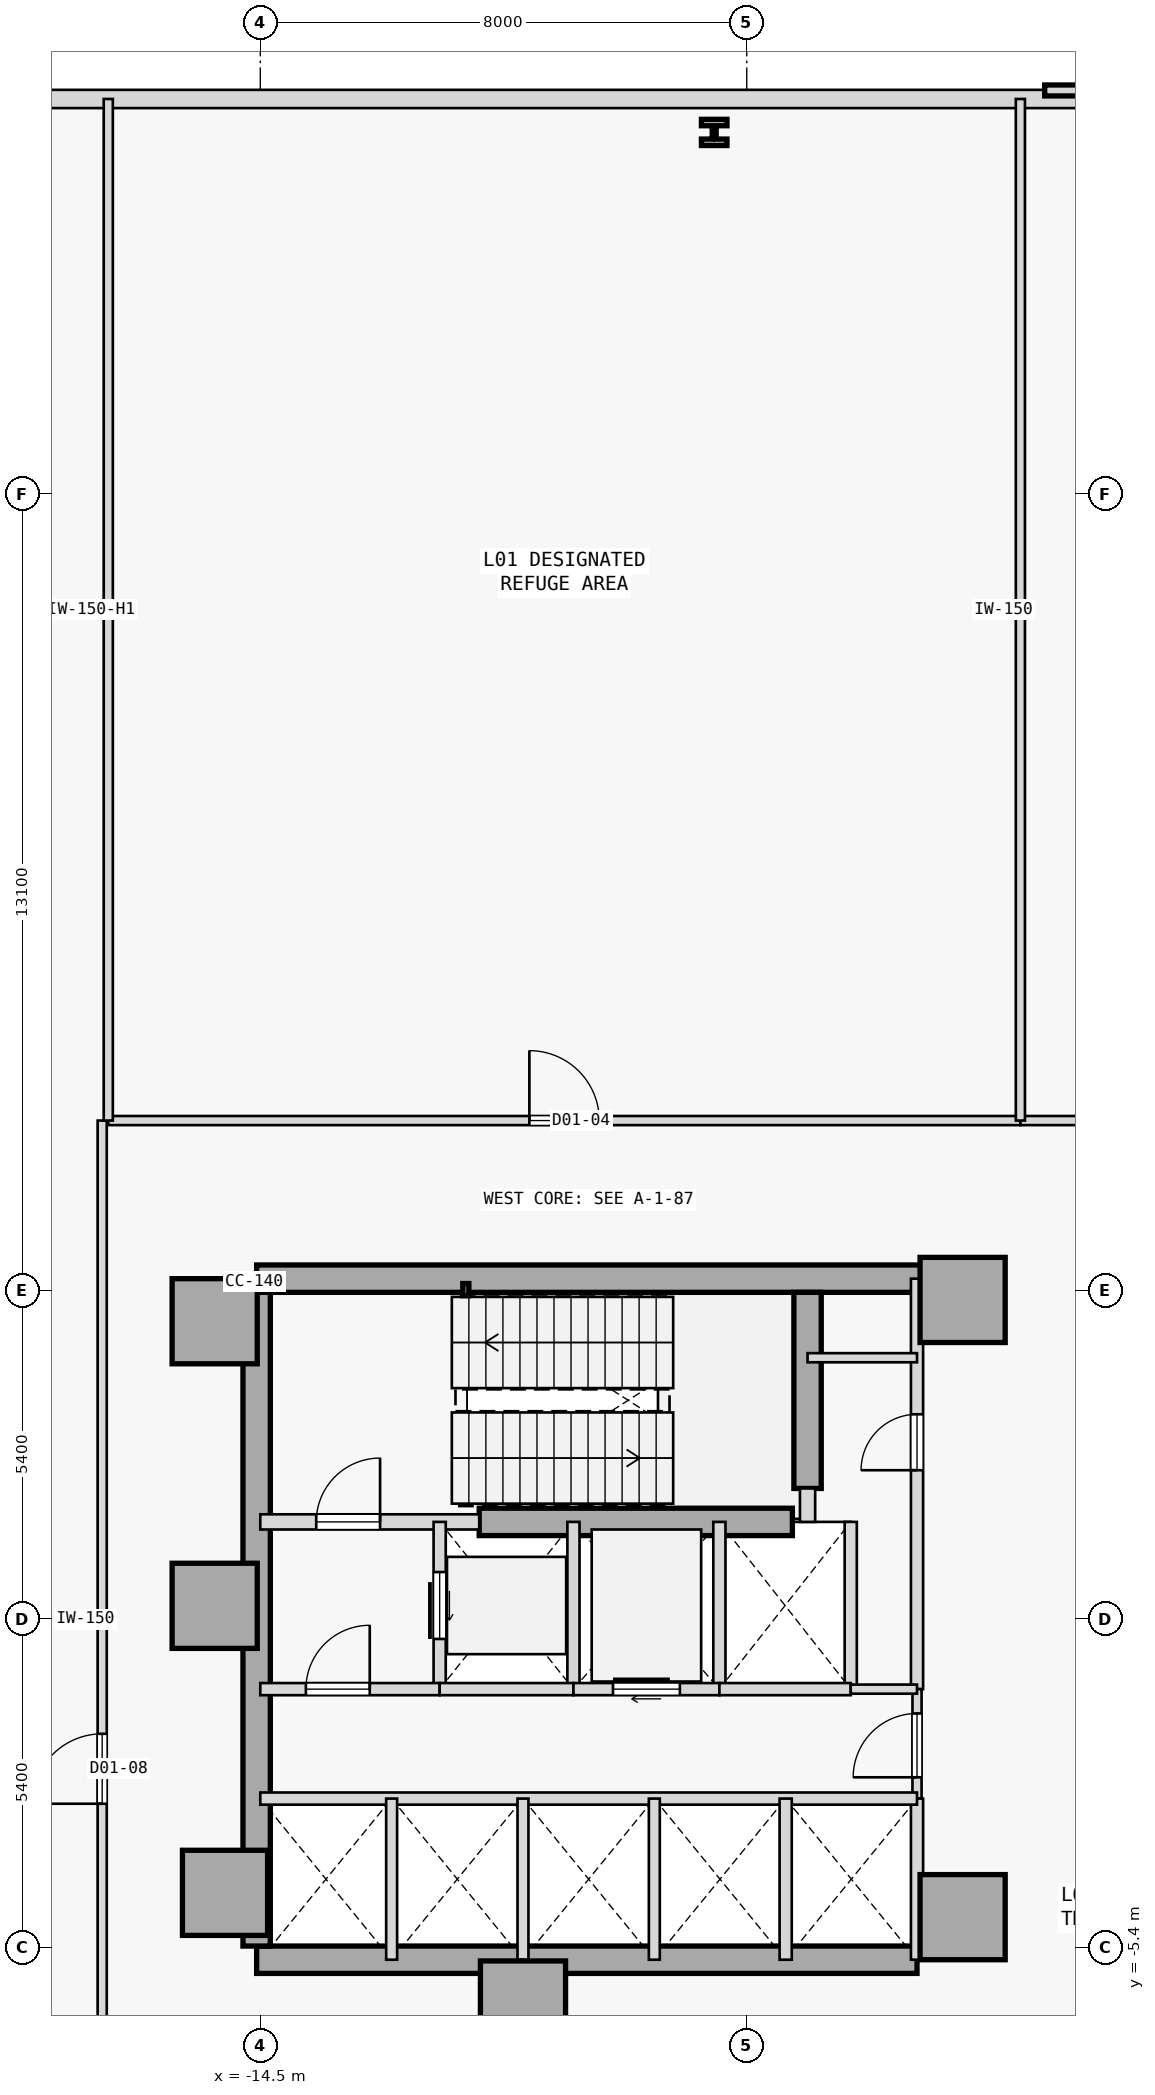
"""IFC4 building model, lengths in metres.
Left out: names, types, materials, properties, quantities, classifications, styles, units other than length and angle.
Written with IfcOpenShell. Run it as: python <this file> out.ifc"""

import sys

from ifc_helpers import new_model, si_unit, direction, frame, frame_2d, origin, origin_2d, place, context, subcontext, project, spatial, rectangle, hollow_rectangle, i_section, extrude, element, fill, save


model = new_model("IFC4")
c1 = context("Model", 3, precision=1e-05, world=origin(), true_north=direction((0.0, 1.0)))
c2 = subcontext(c1, "Body", "Model", "MODEL_VIEW")
j1 = project(units=[si_unit("LENGTHUNIT", "METRE"), si_unit("PLANEANGLEUNIT", "RADIAN")], contexts=[c1])
p1 = place(None, origin())
s1 = spatial("IfcSite", under=j1, at=p1, CompositionType="ELEMENT")
p2 = place(p1, origin())
s2 = spatial("IfcBuilding", under=s1, at=p2, CompositionType="ELEMENT")
p3 = place(p2, frame((0.0, 0.0, 9.6)))
s3 = spatial("IfcBuildingStorey", under=s2, at=p3, CompositionType="ELEMENT", Elevation=9.6)
for number, where, z_axis, x_axis in (
    (1, (-15.25, 4.9, 0.0), (0.0, 0.0, 1.0), (1.0, 0.0, 0.0)),
    (2, (-15.25, 0.22, 0.0), (0.0, 0.0, 1.0), (1.0, 0.0, 0.0)),
    (3, (-15.08, -4.5, 0.0), (0.0, 0.0, 1.0), (1.0, 0.0, 0.0)),
    (4, (-10.18, -6.32, 0.0), (0.0, 0.0, 1.0), (1.0, 0.0, 0.0)),
    (5, (-2.95, -4.9, 0.0), (0.0, 0.0, 1.0), (1.0, 0.0, 0.0)),
    (6, (-2.95, 5.25, 0.0), (0.0, 0.0, 1.0), (1.0, 0.0, 0.0)),
):
    element("IfcColumn", number, at=place(p3, frame(where, z_axis=z_axis, x_axis=x_axis)), inside=s3, PredefinedType="COLUMN", context=c2, shape_type="SweptSolid", body=[
        extrude(rectangle(XDim=1.4, YDim=1.4, at=origin_2d()), origin(), (0.0, 0.0, 1.0), 4.6),
    ])
p4 = place(p3, frame((-14.56, 5.6, 0.0), z_axis=(0.0, 0.0, 1.0), x_axis=(1.0, 0.0, 0.0)))
e7 = element("IfcWall", 7, at=p4, inside=s3, PredefinedType="SHEAR", context=c2, shape_type="SweptSolid", body=[
    extrude(rectangle(XDim=11.41, YDim=0.45, at=frame_2d((5.705, 0.0))), origin(), (0.0, 0.0, 1.0), 4.375),
])
p5 = place(p3, frame((-14.56, -5.6, 0.0), z_axis=(0.0, 0.0, 1.0), x_axis=(1.0, 0.0, 0.0)))
e8 = element("IfcWall", 8, at=p5, inside=s3, PredefinedType="SHEAR", context=c2, shape_type="SweptSolid", body=[
    extrude(rectangle(XDim=10.86, YDim=0.45, at=frame_2d((5.43, 0.0))), origin(), (0.0, 0.0, 1.0), 4.375),
])
p6 = place(p3, frame((-14.56, -5.375, 0.0), z_axis=(0.0, 0.0, 1.0), x_axis=(0.0, 1.0, 0.0)))
e9 = element("IfcWall", 9, at=p6, inside=s3, PredefinedType="SHEAR", context=c2, shape_type="SweptSolid", body=[
    extrude(rectangle(XDim=10.75, YDim=0.45, at=frame_2d((5.375, 0.0))), origin(), (0.0, 0.0, 1.0), 4.375),
])
p7 = place(p3, frame((-5.5, 2.15, 0.0), z_axis=(0.0, 0.0, 1.0), x_axis=(0.0, 1.0, 0.0)))
e10 = element("IfcWall", 10, at=p7, inside=s3, PredefinedType="SHEAR", context=c2, shape_type="SweptSolid", body=[
    extrude(rectangle(XDim=3.225, YDim=0.45, at=frame_2d((1.613, 0.0))), origin(), (0.0, 0.0, 1.0), 4.375),
])
p8 = place(p3, frame((-10.9, 1.6, 0.0), z_axis=(0.0, 0.0, 1.0), x_axis=(1.0, 0.0, 0.0)))
e11 = element("IfcWall", 11, at=p8, inside=s3, PredefinedType="SHEAR", context=c2, shape_type="SweptSolid", body=[
    extrude(rectangle(XDim=5.15, YDim=0.45, at=frame_2d((2.575, 0.0))), origin(), (0.0, 0.0, 1.0), 4.375),
])
p9 = place(p3, frame((-11.12, 5.42, 0.0), z_axis=(0.0, 0.0, 1.0), x_axis=(1.0, 0.0, 0.0)))
e12 = element("IfcColumn", 12, at=p9, inside=s3, PredefinedType="COLUMN", context=c2, shape_type="SweptSolid", body=[
    extrude(hollow_rectangle(XDim=0.1, YDim=0.2, WallThickness=0.008, at=origin_2d()), origin(), (0.0, 0.0, 1.0), 4.6),
])
p10 = place(p3, frame((-7.036, 24.45, 0.0), z_axis=(0.0, 0.0, 1.0), x_axis=(1.0, 0.0, 0.0)))
e13 = element("IfcColumn", 13, at=p10, inside=s3, PredefinedType="COLUMN", context=c2, shape_type="SweptSolid", body=[
    extrude(i_section(OverallWidth=0.42, OverallDepth=0.431, WebThickness=0.065, FlangeThickness=0.106, FilletRadius=0.015, at=origin_2d()), origin(), (0.0, 0.0, 1.0), 4.6),
])
p11 = place(p3, frame((35.455, 25.0, 0.0), z_axis=(0.0, 0.0, 1.0), x_axis=(-1.0, 0.0, 0.0)))
e14 = element("IfcWall", 14, at=p11, inside=s3, PredefinedType="STANDARD", context=c2, shape_type="SweptSolid", body=[
    extrude(rectangle(XDim=70.91, YDim=0.3, at=frame_2d((35.455, 0.0))), origin(), (0.0, 0.0, 1.0), 4.375),
])
p12 = place(p3, frame((-14.5, 1.6, 0.0), z_axis=(0.0, 0.0, 1.0), x_axis=(1.0, 0.0, 0.0)))
e15 = element("IfcWall", 15, at=p12, inside=s3, PredefinedType="STANDARD", context=c2, shape_type="SweptSolid", body=[
    extrude(rectangle(XDim=3.6, YDim=0.25, at=frame_2d((1.8, 0.0))), origin(), (0.0, 0.0, 1.0), 4.375),
])
p13 = place(p12, frame((0.92, 0.0, 0.0)))
e16 = element("IfcOpeningElement", 16, at=p13, cuts=e15, PredefinedType="OPENING", context=c2, shape_type="SweptSolid", body=[
    extrude(rectangle(XDim=1.05, YDim=2.15, at=frame_2d((0.525, 1.075))), frame((0.0, 0.135, 0.0), z_axis=(0.0, -1.0, 0.0), x_axis=(1.0, 0.0, 0.0)), (0.0, 0.0, 1.0), 0.27),
])
p14 = place(p3, frame((-5.5, 1.6, 0.0), z_axis=(0.0, 0.0, 1.0), x_axis=(0.0, 1.0, 0.0)))
e17 = element("IfcWall", 17, at=p14, inside=s3, PredefinedType="STANDARD", context=c2, shape_type="SweptSolid", body=[
    extrude(rectangle(XDim=0.55, YDim=0.25, at=frame_2d((0.275, 0.0))), origin(), (0.0, 0.0, 1.0), 4.375),
])
p15 = place(p3, frame((-3.7, -1.15, 0.0), z_axis=(0.0, 0.0, 1.0), x_axis=(0.0, 1.0, 0.0)))
e18 = element("IfcWall", 18, at=p15, inside=s3, PredefinedType="STANDARD", context=c2, shape_type="SweptSolid", body=[
    extrude(rectangle(XDim=6.75, YDim=0.2, at=frame_2d((3.375, 0.0))), origin(), (0.0, 0.0, 1.0), 4.375),
])
p16 = place(p15, frame((3.6, 0.0, 0.0)))
e19 = element("IfcOpeningElement", 19, at=p16, cuts=e18, PredefinedType="OPENING", context=c2, shape_type="SweptSolid", body=[
    extrude(rectangle(XDim=0.92, YDim=2.15, at=frame_2d((0.46, 1.075))), frame((0.0, 0.11, 0.0), z_axis=(0.0, -1.0, 0.0), x_axis=(1.0, 0.0, 0.0)), (0.0, 0.0, 1.0), 0.22),
])
p17 = place(p3, frame((-3.7, -2.95, 0.0), z_axis=(0.0, 0.0, 1.0), x_axis=(0.0, 1.0, 0.0)))
e20 = element("IfcWall", 20, at=p17, inside=s3, PredefinedType="PARTITIONING", context=c2, shape_type="SweptSolid", body=[
    extrude(rectangle(XDim=1.8, YDim=0.15, at=frame_2d((0.9, 0.0))), origin(), (0.0, 0.0, 1.0), 4.375),
])
p18 = place(p17, frame((0.35, 0.0, 0.0)))
e21 = element("IfcOpeningElement", 21, at=p18, cuts=e20, PredefinedType="OPENING", context=c2, shape_type="SweptSolid", body=[
    extrude(rectangle(XDim=1.05, YDim=2.18, at=frame_2d((0.525, 1.09))), frame((0.0, 0.085, 0.0), z_axis=(0.0, -1.0, 0.0), x_axis=(1.0, 0.0, 0.0)), (0.0, 0.0, 1.0), 0.17),
])
p19 = place(p3, frame((-3.7, -5.6, 0.0), z_axis=(0.0, 0.0, 1.0), x_axis=(0.0, 1.0, 0.0)))
e22 = element("IfcWall", 22, at=p19, inside=s3, PredefinedType="STANDARD", context=c2, shape_type="SweptSolid", body=[
    extrude(rectangle(XDim=2.65, YDim=0.2, at=frame_2d((1.325, 0.0))), origin(), (0.0, 0.0, 1.0), 4.375),
])
p20 = place(p3, frame((-11.55, -1.15, 0.0), z_axis=(0.0, 0.0, 1.0), x_axis=(0.0, 1.0, 0.0)))
e23 = element("IfcWall", 23, at=p20, inside=s3, PredefinedType="STANDARD", context=c2, shape_type="SweptSolid", body=[
    extrude(rectangle(XDim=2.75, YDim=0.2, at=frame_2d((1.375, 0.0))), origin(), (0.0, 0.0, 1.0), 4.375),
])
p21 = place(p20, frame((0.825, 0.0, 0.0)))
e24 = element("IfcOpeningElement", 24, at=p21, cuts=e23, PredefinedType="OPENING", context=c2, shape_type="SweptSolid", body=[
    extrude(rectangle(XDim=1.1, YDim=2.15, at=frame_2d((0.55, 1.075))), frame((0.0, 0.11, 0.0), z_axis=(0.0, -1.0, 0.0), x_axis=(1.0, 0.0, 0.0)), (0.0, 0.0, 1.0), 0.22),
])
p22 = place(p3, frame((-9.35, -1.15, 0.0), z_axis=(0.0, 0.0, 1.0), x_axis=(0.0, 1.0, 0.0)))
e25 = element("IfcWall", 25, at=p22, inside=s3, PredefinedType="STANDARD", context=c2, shape_type="SweptSolid", body=[
    extrude(rectangle(XDim=2.75, YDim=0.2, at=frame_2d((1.375, 0.0))), origin(), (0.0, 0.0, 1.0), 4.375),
])
p23 = place(p3, frame((-14.5, -1.15, 0.0), z_axis=(0.0, 0.0, 1.0), x_axis=(1.0, 0.0, 0.0)))
e26 = element("IfcWall", 26, at=p23, inside=s3, PredefinedType="STANDARD", context=c2, shape_type="SweptSolid", body=[
    extrude(rectangle(XDim=2.95, YDim=0.2, at=frame_2d((1.475, 0.0))), origin(), (0.0, 0.0, 1.0), 4.375),
])
p24 = place(p23, frame((0.75, 0.0, 0.0)))
e27 = element("IfcOpeningElement", 27, at=p24, cuts=e26, PredefinedType="OPENING", context=c2, shape_type="SweptSolid", body=[
    extrude(rectangle(XDim=1.05, YDim=2.18, at=frame_2d((0.525, 1.09))), frame((0.0, 0.11, 0.0), z_axis=(0.0, -1.0, 0.0), x_axis=(1.0, 0.0, 0.0)), (0.0, 0.0, 1.0), 0.22),
])
p25 = place(p3, frame((-11.55, -1.15, 0.0), z_axis=(0.0, 0.0, 1.0), x_axis=(1.0, 0.0, 0.0)))
e28 = element("IfcWall", 28, at=p25, inside=s3, PredefinedType="STANDARD", context=c2, shape_type="SweptSolid", body=[
    extrude(rectangle(XDim=2.2, YDim=0.2, at=frame_2d((1.1, 0.0))), origin(), (0.0, 0.0, 1.0), 4.375),
])
p26 = place(p3, frame((-6.95, -1.15, 0.0), z_axis=(0.0, 0.0, 1.0), x_axis=(0.0, 1.0, 0.0)))
e29 = element("IfcWall", 29, at=p26, inside=s3, PredefinedType="STANDARD", context=c2, shape_type="SweptSolid", body=[
    extrude(rectangle(XDim=2.75, YDim=0.2, at=frame_2d((1.375, 0.0))), origin(), (0.0, 0.0, 1.0), 4.375),
])
p27 = place(p3, frame((-9.35, -1.15, 0.0), z_axis=(0.0, 0.0, 1.0), x_axis=(1.0, 0.0, 0.0)))
e30 = element("IfcWall", 30, at=p27, inside=s3, PredefinedType="STANDARD", context=c2, shape_type="SweptSolid", body=[
    extrude(rectangle(XDim=2.4, YDim=0.2, at=frame_2d((1.2, 0.0))), origin(), (0.0, 0.0, 1.0), 4.375),
])
p28 = place(p27, frame((0.65, 0.0, 0.0)))
e31 = element("IfcOpeningElement", 31, at=p28, cuts=e30, PredefinedType="OPENING", context=c2, shape_type="SweptSolid", body=[
    extrude(rectangle(XDim=1.1, YDim=2.15, at=frame_2d((0.55, 1.075))), frame((0.0, 0.11, 0.0), z_axis=(0.0, -1.0, 0.0), x_axis=(1.0, 0.0, 0.0)), (0.0, 0.0, 1.0), 0.22),
])
p29 = place(p3, frame((-4.79, -1.15, 0.0), z_axis=(0.0, 0.0, 1.0), x_axis=(0.0, 1.0, 0.0)))
e32 = element("IfcWall", 32, at=p29, inside=s3, PredefinedType="STANDARD", context=c2, shape_type="SweptSolid", body=[
    extrude(rectangle(XDim=2.75, YDim=0.2, at=frame_2d((1.375, 0.0))), origin(), (0.0, 0.0, 1.0), 4.375),
])
p30 = place(p3, frame((-6.95, -1.15, 0.0), z_axis=(0.0, 0.0, 1.0), x_axis=(1.0, 0.0, 0.0)))
e33 = element("IfcWall", 33, at=p30, inside=s3, PredefinedType="STANDARD", context=c2, shape_type="SweptSolid", body=[
    extrude(rectangle(XDim=2.16, YDim=0.2, at=frame_2d((1.08, 0.0))), origin(), (0.0, 0.0, 1.0), 4.375),
])
p31 = place(p3, frame((-4.79, -1.15, 0.0), z_axis=(0.0, 0.0, 1.0), x_axis=(1.0, 0.0, 0.0)))
e34 = element("IfcWall", 34, at=p31, inside=s3, PredefinedType="PARTITIONING", context=c2, shape_type="SweptSolid", body=[
    extrude(rectangle(XDim=1.09, YDim=0.15, at=frame_2d((0.545, 0.0))), origin(), (0.0, 0.0, 1.0), 4.375),
])
p32 = place(p3, frame((-14.5, -2.95, 0.0), z_axis=(0.0, 0.0, 1.0), x_axis=(1.0, 0.0, 0.0)))
e35 = element("IfcWall", 35, at=p32, inside=s3, PredefinedType="STANDARD", context=c2, shape_type="SweptSolid", body=[
    extrude(rectangle(XDim=10.8, YDim=0.2, at=frame_2d((5.4, 0.0))), origin(), (0.0, 0.0, 1.0), 4.375),
])
p33 = place(p3, frame((-5.86, -5.6, 0.0), z_axis=(0.0, 0.0, 1.0), x_axis=(0.0, 1.0, 0.0)))
e36 = element("IfcWall", 36, at=p33, inside=s3, PredefinedType="STANDARD", context=c2, shape_type="SweptSolid", body=[
    extrude(rectangle(XDim=2.65, YDim=0.2, at=frame_2d((1.325, 0.0))), origin(), (0.0, 0.0, 1.0), 4.375),
])
for number, where, z_axis, x_axis in (
    (37, (-12.34, -5.6, 0.0), (0.0, 0.0, 1.0), (0.0, 1.0, 0.0)),
    (38, (-10.18, -5.6, 0.0), (0.0, 0.0, 1.0), (0.0, 1.0, 0.0)),
    (39, (-8.02, -5.6, 0.0), (0.0, 0.0, 1.0), (0.0, 1.0, 0.0)),
):
    element("IfcWall", number, at=place(p3, frame(where, z_axis=z_axis, x_axis=x_axis)), inside=s3, PredefinedType="STANDARD", context=c2, shape_type="SweptSolid", body=[
        extrude(rectangle(XDim=2.65, YDim=0.18, at=frame_2d((1.325, 0.0))), origin(), (0.0, 0.0, 1.0), 4.375),
    ])
p34 = place(p3, frame((-5.5, 4.3, 0.0), z_axis=(0.0, 0.0, 1.0), x_axis=(1.0, 0.0, 0.0)))
e40 = element("IfcWall", 40, at=p34, inside=s3, PredefinedType="PARTITIONING", context=c2, shape_type="SweptSolid", body=[
    extrude(rectangle(XDim=1.8, YDim=0.15, at=frame_2d((0.9, 0.0))), origin(), (0.0, 0.0, 1.0), 4.375),
])
p35 = place(p3, frame((-17.0, 8.2, 0.0), z_axis=(0.0, 0.0, 1.0), x_axis=(1.0, 0.0, 0.0)))
e41 = element("IfcWall", 41, at=p35, inside=s3, PredefinedType="PARTITIONING", context=c2, shape_type="SweptSolid", body=[
    extrude(rectangle(XDim=15.0, YDim=0.15, at=frame_2d((7.5, 0.0))), origin(), (0.0, 0.0, 1.0), 4.375),
])
p36 = place(p35, frame((6.925, 0.0, 0.0)))
e42 = element("IfcOpeningElement", 42, at=p36, cuts=e41, PredefinedType="OPENING", context=c2, shape_type="SweptSolid", body=[
    extrude(rectangle(XDim=1.15, YDim=2.15, at=frame_2d((0.575, 1.075))), frame((0.0, 0.085, 0.0), z_axis=(0.0, -1.0, 0.0), x_axis=(1.0, 0.0, 0.0)), (0.0, 0.0, 1.0), 0.17),
])
p37 = place(p3, frame((-2.0, 8.2, 0.0), z_axis=(0.0, 0.0, 1.0), x_axis=(1.0, 0.0, 0.0)))
e43 = element("IfcWall", 43, at=p37, inside=s3, PredefinedType="PARTITIONING", context=c2, shape_type="SweptSolid", body=[
    extrude(rectangle(XDim=19.1, YDim=0.15, at=frame_2d((9.55, 0.0))), origin(), (0.0, 0.0, 1.0), 4.375),
])
p38 = place(p37, frame((8.975, 0.0, 0.0)))
e44 = element("IfcOpeningElement", 44, at=p38, cuts=e43, PredefinedType="OPENING", context=c2, shape_type="SweptSolid", body=[
    extrude(rectangle(XDim=1.15, YDim=2.15, at=frame_2d((0.575, 1.075))), frame((0.0, 0.085, 0.0), z_axis=(0.0, -1.0, 0.0), x_axis=(1.0, 0.0, 0.0)), (0.0, 0.0, 1.0), 0.17),
])
p39 = place(p3, frame((-17.1, -8.2, 0.0), z_axis=(0.0, 0.0, 1.0), x_axis=(0.0, 1.0, 0.0)))
e45 = element("IfcWall", 45, at=p39, inside=s3, PredefinedType="PARTITIONING", context=c2, shape_type="SweptSolid", body=[
    extrude(rectangle(XDim=16.4, YDim=0.15, at=frame_2d((8.2, 0.0))), origin(), (0.0, 0.0, 1.0), 4.375),
])
p40 = place(p39, frame((5.165, 0.0, 0.0)))
e46 = element("IfcOpeningElement", 46, at=p40, cuts=e45, PredefinedType="OPENING", context=c2, shape_type="SweptSolid", body=[
    extrude(rectangle(XDim=1.15, YDim=2.15, at=frame_2d((0.575, 1.075))), frame((0.0, 0.085, 0.0), z_axis=(0.0, -1.0, 0.0), x_axis=(1.0, 0.0, 0.0)), (0.0, 0.0, 1.0), 0.17),
])
p41 = place(p3, frame((-2.0, 8.2, 0.0), z_axis=(0.0, 0.0, 1.0), x_axis=(0.0, 1.0, 0.0)))
e47 = element("IfcWall", 47, at=p41, inside=s3, PredefinedType="PARTITIONING", context=c2, shape_type="SweptSolid", body=[
    extrude(rectangle(XDim=16.8, YDim=0.15, at=frame_2d((8.4, 0.0))), origin(), (0.0, 0.0, 1.0), 4.375),
])
p42 = place(p3, frame((-17.0, 8.2, 0.0), z_axis=(0.0, 0.0, 1.0), x_axis=(0.0, 1.0, 0.0)))
e48 = element("IfcWall", 48, at=p42, inside=s3, PredefinedType="PARTITIONING", context=c2, shape_type="SweptSolid", body=[
    extrude(rectangle(XDim=16.8, YDim=0.15, at=frame_2d((8.4, 0.0))), origin(), (0.0, 0.0, 1.0), 3.925),
])
p43 = place(p13, origin())
e49 = element("IfcDoor", 49, at=p43, inside=s3, OperationType="SINGLE_SWING_RIGHT", PredefinedType="DOOR", context=c2, shape_type="SweptSolid", body=[
    extrude(rectangle(XDim=1.05, YDim=2.15, at=frame_2d((0.525, 1.075))), frame((0.0, 0.025, 0.0), z_axis=(0.0, -1.0, 0.0), x_axis=(1.0, 0.0, 0.0)), (0.0, 0.0, 1.0), 0.05),
])
fill(e16, e49)
p44 = place(p24, origin())
e50 = element("IfcDoor", 50, at=p44, inside=s3, OperationType="SINGLE_SWING_RIGHT", PredefinedType="DOOR", context=c2, shape_type="SweptSolid", body=[
    extrude(rectangle(XDim=1.05, YDim=2.18, at=frame_2d((0.525, 1.09))), frame((0.0, 0.025, 0.0), z_axis=(0.0, -1.0, 0.0), x_axis=(1.0, 0.0, 0.0)), (0.0, 0.0, 1.0), 0.05),
])
fill(e27, e50)
p45 = place(p18, origin())
e51 = element("IfcDoor", 51, at=p45, inside=s3, OperationType="SINGLE_SWING_LEFT", PredefinedType="DOOR", context=c2, shape_type="SweptSolid", body=[
    extrude(rectangle(XDim=1.05, YDim=2.18, at=frame_2d((0.525, 1.09))), frame((0.0, 0.025, 0.0), z_axis=(0.0, -1.0, 0.0), x_axis=(1.0, 0.0, 0.0)), (0.0, 0.0, 1.0), 0.05),
])
fill(e21, e51)
p46 = place(p21, origin())
e52 = element("IfcDoor", 52, at=p46, inside=s3, OperationType="SLIDING_TO_RIGHT", PredefinedType="DOOR", context=c2, shape_type="SweptSolid", body=[
    extrude(rectangle(XDim=1.1, YDim=2.15, at=frame_2d((0.55, 1.075))), frame((0.0, 0.025, 0.0), z_axis=(0.0, -1.0, 0.0), x_axis=(1.0, 0.0, 0.0)), (0.0, 0.0, 1.0), 0.05),
])
fill(e24, e52)
p47 = place(p28, origin())
e53 = element("IfcDoor", 53, at=p47, inside=s3, OperationType="SLIDING_TO_RIGHT", PredefinedType="DOOR", context=c2, shape_type="SweptSolid", body=[
    extrude(rectangle(XDim=1.1, YDim=2.15, at=frame_2d((0.55, 1.075))), frame((0.0, 0.025, 0.0), z_axis=(0.0, -1.0, 0.0), x_axis=(1.0, 0.0, 0.0)), (0.0, 0.0, 1.0), 0.05),
])
fill(e31, e53)
p48 = place(p16, origin())
e54 = element("IfcDoor", 54, at=p48, inside=s3, OperationType="SINGLE_SWING_LEFT", PredefinedType="DOOR", context=c2, shape_type="SweptSolid", body=[
    extrude(rectangle(XDim=0.92, YDim=2.15, at=frame_2d((0.46, 1.075))), frame((0.0, 0.025, 0.0), z_axis=(0.0, -1.0, 0.0), x_axis=(1.0, 0.0, 0.0)), (0.0, 0.0, 1.0), 0.05),
])
fill(e19, e54)
p49 = place(p36, origin())
e55 = element("IfcDoor", 55, at=p49, inside=s3, OperationType="SINGLE_SWING_LEFT", PredefinedType="DOOR", context=c2, shape_type="SweptSolid", body=[
    extrude(rectangle(XDim=1.15, YDim=2.15, at=frame_2d((0.575, 1.075))), frame((0.0, 0.025, 0.0), z_axis=(0.0, -1.0, 0.0), x_axis=(1.0, 0.0, 0.0)), (0.0, 0.0, 1.0), 0.05),
])
fill(e42, e55)
p50 = place(p40, origin())
e56 = element("IfcDoor", 56, at=p50, inside=s3, OperationType="SINGLE_SWING_LEFT", PredefinedType="DOOR", context=c2, shape_type="SweptSolid", body=[
    extrude(rectangle(XDim=1.15, YDim=2.15, at=frame_2d((0.575, 1.075))), frame((0.0, 0.025, 0.0), z_axis=(0.0, -1.0, 0.0), x_axis=(1.0, 0.0, 0.0)), (0.0, 0.0, 1.0), 0.05),
])
fill(e46, e56)
save(model, sys.argv[1])
